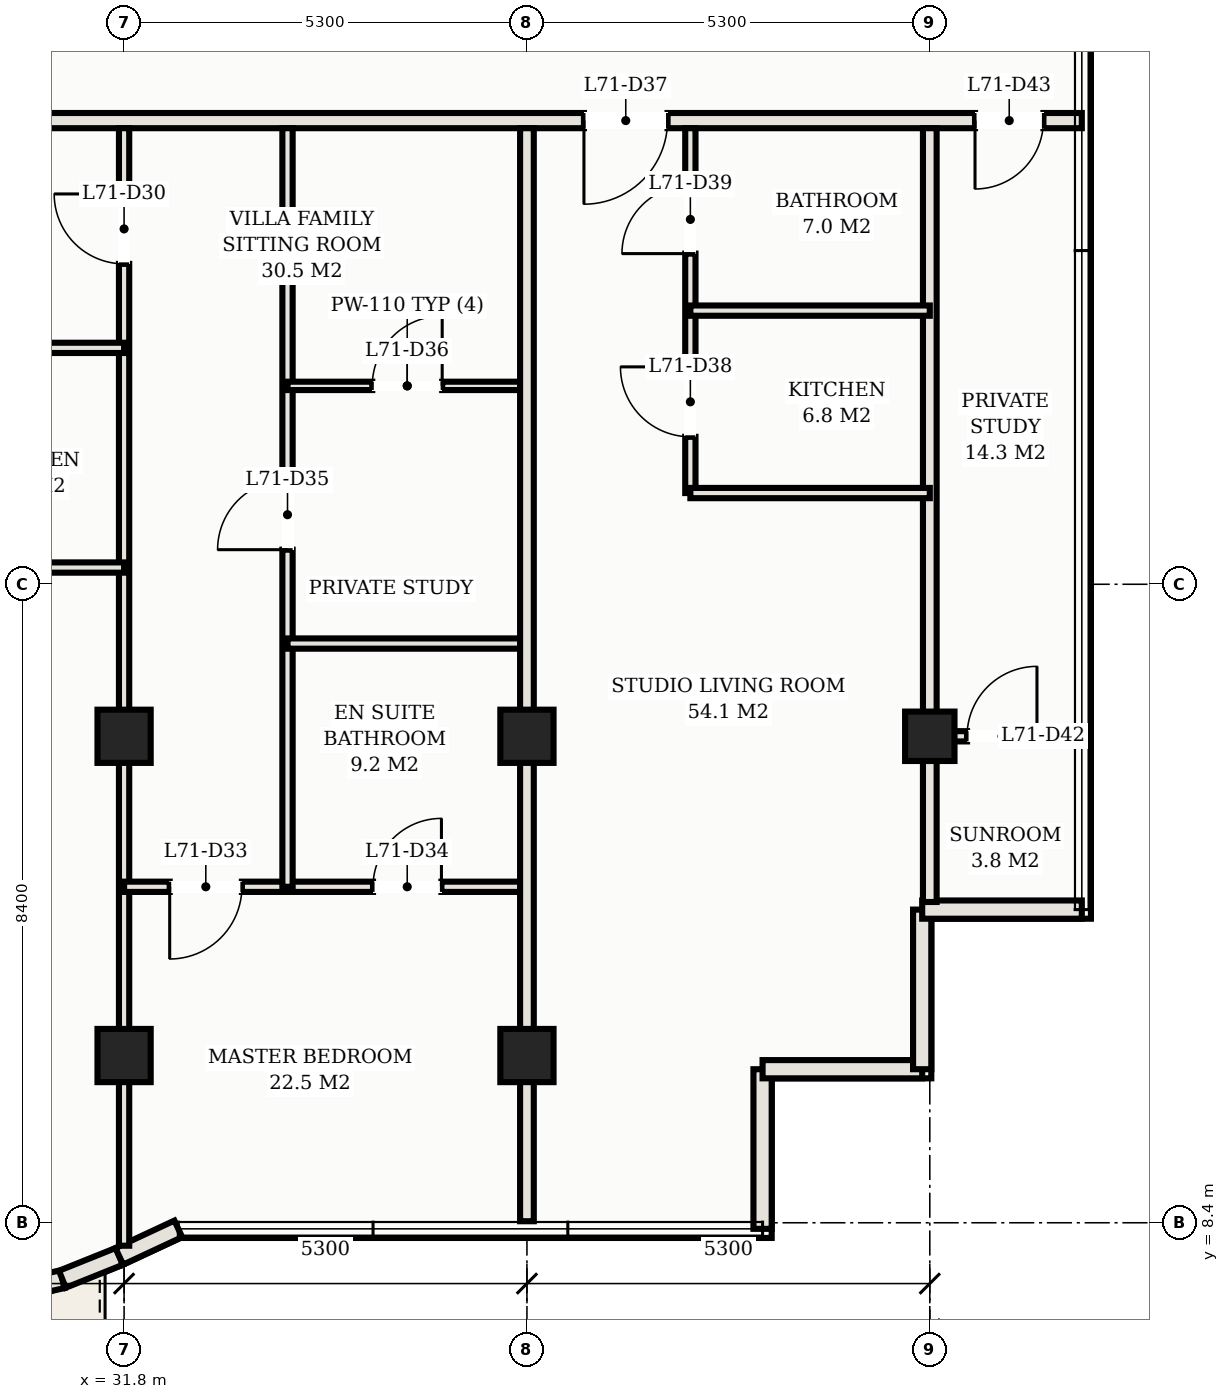
"""IFC4 building model, lengths in metres.
Left out: names, types, materials, properties, quantities, classifications, styles, units other than length and angle.
Written with IfcOpenShell. Run it as: python <this file> out.ifc"""

import sys

from ifc_helpers import new_model, si_unit, direction, frame, frame_2d, origin, origin_2d, place, context, subcontext, project, spatial, rectangle, hollow_rectangle, extrude, element, fill, save


model = new_model("IFC4")
c1 = context("Model", 3, precision=1e-05, world=origin(), true_north=direction((0.0, 1.0)))
c2 = subcontext(c1, "Body", "Model", "MODEL_VIEW")
j1 = project(units=[si_unit("LENGTHUNIT", "METRE"), si_unit("PLANEANGLEUNIT", "RADIAN")], contexts=[c1])
p1 = place(None, origin())
s1 = spatial("IfcSite", under=j1, at=p1, CompositionType="ELEMENT")
p2 = place(p1, origin())
s2 = spatial("IfcBuilding", under=s1, at=p2, CompositionType="ELEMENT")
p3 = place(p2, frame((0.0, 0.0, 256.1)))
s3 = spatial("IfcBuildingStorey", under=s2, at=p3, CompositionType="ELEMENT", Elevation=256.1)
for number, where, z_axis, x_axis in (
    (1, (31.8, 14.8, 0.0), (0.0, 0.0, 1.0), (1.0, 0.0, 0.0)),
    (2, (31.8, 10.6, 0.0), (0.0, 0.0, 1.0), (1.0, 0.0, 0.0)),
    (3, (37.1, 14.8, 0.0), (0.0, 0.0, 1.0), (1.0, 0.0, 0.0)),
    (4, (37.1, 10.6, 0.0), (0.0, 0.0, 1.0), (1.0, 0.0, 0.0)),
):
    element("IfcColumn", number, at=place(p3, frame(where, z_axis=z_axis, x_axis=x_axis)), inside=s3, PredefinedType="COLUMN", context=c2, shape_type="SweptSolid", body=[
        extrude(hollow_rectangle(XDim=0.7, YDim=0.7, WallThickness=0.025, at=origin_2d()), origin(), (0.0, 0.0, 1.0), 3.3),
    ])
p4 = place(p3, frame((42.4, 14.8, 0.0), z_axis=(0.0, 0.0, 1.0), x_axis=(1.0, 0.0, 0.0)))
e5 = element("IfcColumn", 5, at=p4, inside=s3, PredefinedType="COLUMN", context=c2, shape_type="SweptSolid", body=[
    extrude(hollow_rectangle(XDim=0.65, YDim=0.65, WallThickness=0.022, at=origin_2d()), origin(), (0.0, 0.0, 1.0), 3.3),
])
p5 = place(p3, frame((27.248, 6.843, 0.0), z_axis=(0.0, 0.0, 1.0), x_axis=(0.977126252677, 0.212660025225, 0.0)))
e6 = element("IfcWall", 6, at=p5, inside=s3, PredefinedType="SOLIDWALL", context=c2, shape_type="SweptSolid", body=[
    extrude(rectangle(XDim=3.828, YDim=0.24, at=frame_2d((1.914, 0.0))), origin(), (0.0, 0.0, 1.0), 3.11),
])
p6 = place(p5, frame((1.014, 0.0, 0.0)))
e7 = element("IfcOpeningElement", 7, at=p6, cuts=e6, PredefinedType="OPENING", context=c2, shape_type="SweptSolid", body=[
    extrude(rectangle(XDim=1.8, YDim=2.2, at=frame_2d((0.9, 1.1))), frame((0.0, 0.13, 0.0), z_axis=(0.0, -1.0, 0.0), x_axis=(1.0, 0.0, 0.0)), (0.0, 0.0, 1.0), 0.26),
])
p7 = place(p3, frame((30.988, 7.657, 0.0), z_axis=(0.0, 0.0, 1.0), x_axis=(0.927870589467, 0.372902358805, 0.0)))
e8 = element("IfcWall", 8, at=p7, inside=s3, PredefinedType="SOLIDWALL", context=c2, shape_type="SweptSolid", body=[
    extrude(rectangle(XDim=0.807, YDim=0.24, at=frame_2d((0.404, 0.0))), origin(), (0.0, 0.0, 1.0), 3.11),
])
p8 = place(p3, frame((31.737, 7.958, 0.0), z_axis=(0.0, 0.0, 1.0), x_axis=(0.906190424584, 0.422869855147, 0.0)))
e9 = element("IfcWall", 9, at=p8, inside=s3, PredefinedType="SOLIDWALL", context=c2, shape_type="SweptSolid", body=[
    extrude(rectangle(XDim=0.856, YDim=0.24, at=frame_2d((0.428, 0.0))), origin(), (0.0, 0.0, 1.0), 3.11),
])
p9 = place(p3, frame((40.2, 8.32, 0.0), z_axis=(0.0, 0.0, 1.0), x_axis=(0.0, 1.0, 0.0)))
e10 = element("IfcWall", 10, at=p9, inside=s3, PredefinedType="SOLIDWALL", context=c2, shape_type="SweptSolid", body=[
    extrude(rectangle(XDim=2.1, YDim=0.24, at=frame_2d((1.05, 0.0))), origin(), (0.0, 0.0, 1.0), 3.11),
])
for number, where, z_axis, x_axis in (
    (11, (40.2, 10.42, 0.0), (0.0, 0.0, 1.0), (1.0, 0.0, 0.0)),
    (12, (42.3, 10.42, 0.0), (0.0, 0.0, 1.0), (0.0, 1.0, 0.0)),
):
    element("IfcWall", number, at=place(p3, frame(where, z_axis=z_axis, x_axis=x_axis)), inside=s3, PredefinedType="SOLIDWALL", context=c2, shape_type="SweptSolid", body=[
        extrude(rectangle(XDim=2.1, YDim=0.24, at=frame_2d((1.05, 0.0))), origin(), (0.0, 0.0, 1.0), 3.11),
    ])
p10 = place(p3, frame((42.3, 12.52, 0.0), z_axis=(0.0, 0.0, 1.0), x_axis=(1.0, 0.0, 0.0)))
e13 = element("IfcWall", 13, at=p10, inside=s3, PredefinedType="SOLIDWALL", context=c2, shape_type="SweptSolid", body=[
    extrude(rectangle(XDim=2.1, YDim=0.24, at=frame_2d((1.05, 0.0))), origin(), (0.0, 0.0, 1.0), 3.11),
])
p11 = place(p3, frame((8.6, 22.9, 0.0), z_axis=(0.0, 0.0, 1.0), x_axis=(1.0, 0.0, 0.0)))
e14 = element("IfcWall", 14, at=p11, inside=s3, PredefinedType="PARTITIONING", context=c2, shape_type="SweptSolid", body=[
    extrude(rectangle(XDim=35.8, YDim=0.2, at=frame_2d((17.9, 0.0))), origin(), (0.0, 0.0, 1.0), 2.45),
])
p12 = place(p11, frame((2.625, 0.0, 0.0)))
e15 = element("IfcOpeningElement", 15, at=p12, cuts=e14, PredefinedType="OPENING", context=c2, shape_type="SweptSolid", body=[
    extrude(rectangle(XDim=1.35, YDim=2.33, at=frame_2d((0.675, 1.165))), frame((0.0, 0.11, 0.0), z_axis=(0.0, -1.0, 0.0), x_axis=(1.0, 0.0, 0.0)), (0.0, 0.0, 1.0), 0.22),
])
p13 = place(p11, frame((18.65, 0.0, 0.0)))
e16 = element("IfcOpeningElement", 16, at=p13, cuts=e14, PredefinedType="OPENING", context=c2, shape_type="SweptSolid", body=[
    extrude(rectangle(XDim=1.1, YDim=2.25, at=frame_2d((0.55, 1.125))), frame((0.0, 0.11, 0.0), z_axis=(0.0, -1.0, 0.0), x_axis=(1.0, 0.0, 0.0)), (0.0, 0.0, 1.0), 0.22),
])
p14 = place(p11, frame((29.25, 0.0, 0.0)))
e17 = element("IfcOpeningElement", 17, at=p14, cuts=e14, PredefinedType="OPENING", context=c2, shape_type="SweptSolid", body=[
    extrude(rectangle(XDim=1.1, YDim=2.25, at=frame_2d((0.55, 1.125))), frame((0.0, 0.11, 0.0), z_axis=(0.0, -1.0, 0.0), x_axis=(1.0, 0.0, 0.0)), (0.0, 0.0, 1.0), 0.22),
])
p15 = place(p11, frame((0.505, 0.0, 0.0)))
e18 = element("IfcOpeningElement", 18, at=p15, cuts=e14, PredefinedType="OPENING", context=c2, shape_type="SweptSolid", body=[
    extrude(rectangle(XDim=0.9, YDim=2.15, at=frame_2d((0.45, 1.075))), frame((0.0, 0.11, 0.0), z_axis=(0.0, -1.0, 0.0), x_axis=(1.0, 0.0, 0.0)), (0.0, 0.0, 1.0), 0.22),
])
p16 = place(p11, frame((34.395, 0.0, 0.0)))
e19 = element("IfcOpeningElement", 19, at=p16, cuts=e14, PredefinedType="OPENING", context=c2, shape_type="SweptSolid", body=[
    extrude(rectangle(XDim=0.9, YDim=2.15, at=frame_2d((0.45, 1.075))), frame((0.0, 0.11, 0.0), z_axis=(0.0, -1.0, 0.0), x_axis=(1.0, 0.0, 0.0)), (0.0, 0.0, 1.0), 0.22),
])
p17 = place(p3, frame((42.4, 12.62, 0.0), z_axis=(0.0, 0.0, 1.0), x_axis=(0.0, 1.0, 0.0)))
e20 = element("IfcWall", 20, at=p17, inside=s3, PredefinedType="PARTITIONING", context=c2, shape_type="SweptSolid", body=[
    extrude(rectangle(XDim=10.18, YDim=0.18, at=frame_2d((5.09, 0.0))), origin(), (0.0, 0.0, 1.0), 2.45),
])
p18 = place(p3, frame((31.8, 8.098, 0.0), z_axis=(0.0, 0.0, 1.0), x_axis=(0.0, 1.0, 0.0)))
e21 = element("IfcWall", 21, at=p18, inside=s3, PredefinedType="PARTITIONING", context=c2, shape_type="SweptSolid", body=[
    extrude(rectangle(XDim=14.702, YDim=0.135, at=frame_2d((7.351, 0.0))), origin(), (0.0, 0.0, 1.0), 2.45),
])
p19 = place(p18, frame((12.917, 0.0, 0.0)))
e22 = element("IfcOpeningElement", 22, at=p19, cuts=e21, PredefinedType="OPENING", context=c2, shape_type="SweptSolid", body=[
    extrude(rectangle(XDim=0.92, YDim=2.15, at=frame_2d((0.46, 1.075))), frame((0.0, 0.078, 0.0), z_axis=(0.0, -1.0, 0.0), x_axis=(1.0, 0.0, 0.0)), (0.0, 0.0, 1.0), 0.155),
])
for number, where, z_axis, x_axis in (
    (23, (28.65, 17.02, 0.0), (0.0, 0.0, 1.0), (1.0, 0.0, 0.0)),
    (24, (28.65, 19.91, 0.0), (0.0, 0.0, 1.0), (1.0, 0.0, 0.0)),
):
    element("IfcWall", number, at=place(p3, frame(where, z_axis=z_axis, x_axis=x_axis)), inside=s3, PredefinedType="PARTITIONING", context=c2, shape_type="SweptSolid", body=[
        extrude(rectangle(XDim=3.15, YDim=0.135, at=frame_2d((1.575, 0.0))), origin(), (0.0, 0.0, 1.0), 2.45),
    ])
p20 = place(p3, frame((31.8, 12.82, 0.0), z_axis=(0.0, 0.0, 1.0), x_axis=(1.0, 0.0, 0.0)))
e25 = element("IfcWall", 25, at=p20, inside=s3, PredefinedType="PARTITIONING", context=c2, shape_type="SweptSolid", body=[
    extrude(rectangle(XDim=5.3, YDim=0.135, at=frame_2d((2.65, 0.0))), origin(), (0.0, 0.0, 1.0), 2.45),
])
p21 = place(p20, frame((0.6, 0.0, 0.0)))
e26 = element("IfcOpeningElement", 26, at=p21, cuts=e25, PredefinedType="OPENING", context=c2, shape_type="SweptSolid", body=[
    extrude(rectangle(XDim=0.95, YDim=2.15, at=frame_2d((0.475, 1.075))), frame((0.0, 0.078, 0.0), z_axis=(0.0, -1.0, 0.0), x_axis=(1.0, 0.0, 0.0)), (0.0, 0.0, 1.0), 0.155),
])
p22 = place(p20, frame((3.275, 0.0, 0.0)))
e27 = element("IfcOpeningElement", 27, at=p22, cuts=e25, PredefinedType="OPENING", context=c2, shape_type="SweptSolid", body=[
    extrude(rectangle(XDim=0.9, YDim=2.15, at=frame_2d((0.45, 1.075))), frame((0.0, 0.078, 0.0), z_axis=(0.0, -1.0, 0.0), x_axis=(1.0, 0.0, 0.0)), (0.0, 0.0, 1.0), 0.155),
])
p23 = place(p3, frame((33.95, 12.82, 0.0), z_axis=(0.0, 0.0, 1.0), x_axis=(0.0, 1.0, 0.0)))
e28 = element("IfcWall", 28, at=p23, inside=s3, PredefinedType="PARTITIONING", context=c2, shape_type="SweptSolid", body=[
    extrude(rectangle(XDim=9.98, YDim=0.135, at=frame_2d((4.99, 0.0))), origin(), (0.0, 0.0, 1.0), 2.45),
])
p24 = place(p23, frame((4.435, 0.0, 0.0)))
e29 = element("IfcOpeningElement", 29, at=p24, cuts=e28, PredefinedType="OPENING", context=c2, shape_type="SweptSolid", body=[
    extrude(rectangle(XDim=0.92, YDim=2.15, at=frame_2d((0.46, 1.075))), frame((0.0, 0.078, 0.0), z_axis=(0.0, -1.0, 0.0), x_axis=(1.0, 0.0, 0.0)), (0.0, 0.0, 1.0), 0.155),
])
p25 = place(p3, frame((33.95, 16.02, 0.0), z_axis=(0.0, 0.0, 1.0), x_axis=(1.0, 0.0, 0.0)))
e30 = element("IfcWall", 30, at=p25, inside=s3, PredefinedType="PARTITIONING", context=c2, shape_type="SweptSolid", body=[
    extrude(rectangle(XDim=3.15, YDim=0.135, at=frame_2d((1.575, 0.0))), origin(), (0.0, 0.0, 1.0), 2.45),
])
p26 = place(p3, frame((33.95, 19.41, 0.0), z_axis=(0.0, 0.0, 1.0), x_axis=(1.0, 0.0, 0.0)))
e31 = element("IfcWall", 31, at=p26, inside=s3, PredefinedType="MOVABLE", context=c2, shape_type="SweptSolid", body=[
    extrude(rectangle(XDim=3.15, YDim=0.11, at=frame_2d((1.575, 0.0))), origin(), (0.0, 0.0, 1.0), 2.45),
])
p27 = place(p26, frame((1.115, 0.0, 0.0)))
e32 = element("IfcOpeningElement", 32, at=p27, cuts=e31, PredefinedType="OPENING", context=c2, shape_type="SweptSolid", body=[
    extrude(rectangle(XDim=0.92, YDim=2.15, at=frame_2d((0.46, 1.075))), frame((0.0, 0.065, 0.0), z_axis=(0.0, -1.0, 0.0), x_axis=(1.0, 0.0, 0.0)), (0.0, 0.0, 1.0), 0.13),
])
p28 = place(p3, frame((37.1, 8.42, 0.0), z_axis=(0.0, 0.0, 1.0), x_axis=(0.0, 1.0, 0.0)))
e33 = element("IfcWall", 33, at=p28, inside=s3, PredefinedType="PARTITIONING", context=c2, shape_type="SweptSolid", body=[
    extrude(rectangle(XDim=14.38, YDim=0.18, at=frame_2d((7.19, 0.0))), origin(), (0.0, 0.0, 1.0), 2.45),
])
p29 = place(p3, frame((39.25, 18.0, 0.0), z_axis=(0.0, 0.0, 1.0), x_axis=(0.0, 1.0, 0.0)))
e34 = element("IfcWall", 34, at=p29, inside=s3, PredefinedType="PARTITIONING", context=c2, shape_type="SweptSolid", body=[
    extrude(rectangle(XDim=4.8, YDim=0.135, at=frame_2d((2.4, 0.0))), origin(), (0.0, 0.0, 1.0), 2.45),
])
p30 = place(p29, frame((0.74, 0.0, 0.0)))
e35 = element("IfcOpeningElement", 35, at=p30, cuts=e34, PredefinedType="OPENING", context=c2, shape_type="SweptSolid", body=[
    extrude(rectangle(XDim=0.92, YDim=2.15, at=frame_2d((0.46, 1.075))), frame((0.0, 0.078, 0.0), z_axis=(0.0, -1.0, 0.0), x_axis=(1.0, 0.0, 0.0)), (0.0, 0.0, 1.0), 0.155),
])
p31 = place(p29, frame((3.15, 0.0, 0.0)))
e36 = element("IfcOpeningElement", 36, at=p31, cuts=e34, PredefinedType="OPENING", context=c2, shape_type="SweptSolid", body=[
    extrude(rectangle(XDim=0.9, YDim=2.15, at=frame_2d((0.45, 1.075))), frame((0.0, 0.078, 0.0), z_axis=(0.0, -1.0, 0.0), x_axis=(1.0, 0.0, 0.0)), (0.0, 0.0, 1.0), 0.155),
])
for number, where, z_axis, x_axis in (
    (37, (39.25, 18.0, 0.0), (0.0, 0.0, 1.0), (1.0, 0.0, 0.0)),
    (38, (39.25, 20.4, 0.0), (0.0, 0.0, 1.0), (1.0, 0.0, 0.0)),
):
    element("IfcWall", number, at=place(p3, frame(where, z_axis=z_axis, x_axis=x_axis)), inside=s3, PredefinedType="PARTITIONING", context=c2, shape_type="SweptSolid", body=[
        extrude(rectangle(XDim=3.15, YDim=0.135, at=frame_2d((1.575, 0.0))), origin(), (0.0, 0.0, 1.0), 2.45),
    ])
p32 = place(p3, frame((42.4, 14.8, 0.0), z_axis=(0.0, 0.0, 1.0), x_axis=(1.0, 0.0, 0.0)))
e39 = element("IfcWall", 39, at=p32, inside=s3, PredefinedType="PARTITIONING", context=c2, shape_type="SweptSolid", body=[
    extrude(rectangle(XDim=1.9, YDim=0.135, at=frame_2d((0.95, 0.0))), origin(), (0.0, 0.0, 1.0), 2.45),
])
p33 = place(p32, frame((0.49, 0.0, 0.0)))
e40 = element("IfcOpeningElement", 40, at=p33, cuts=e39, PredefinedType="OPENING", context=c2, shape_type="SweptSolid", body=[
    extrude(rectangle(XDim=0.92, YDim=2.15, at=frame_2d((0.46, 1.075))), frame((0.0, 0.078, 0.0), z_axis=(0.0, -1.0, 0.0), x_axis=(1.0, 0.0, 0.0)), (0.0, 0.0, 1.0), 0.155),
])
p34 = place(p19, origin())
e41 = element("IfcDoor", 41, at=p34, inside=s3, OperationType="SINGLE_SWING_RIGHT", PredefinedType="DOOR", context=c2, shape_type="SweptSolid", body=[
    extrude(rectangle(XDim=0.92, YDim=2.15, at=frame_2d((0.46, 1.075))), frame((0.0, 0.025, 0.0), z_axis=(0.0, -1.0, 0.0), x_axis=(1.0, 0.0, 0.0)), (0.0, 0.0, 1.0), 0.05),
])
fill(e22, e41)
p35 = place(p21, frame((0.95, 0.0, 0.0), z_axis=(0.0, 0.0, 1.0), x_axis=(-1.0, 0.0, 0.0)))
e42 = element("IfcDoor", 42, at=p35, inside=s3, OperationType="SINGLE_SWING_RIGHT", PredefinedType="DOOR", context=c2, shape_type="SweptSolid", body=[
    extrude(rectangle(XDim=0.95, YDim=2.15, at=frame_2d((0.475, 1.075))), frame((0.0, 0.025, 0.0), z_axis=(0.0, -1.0, 0.0), x_axis=(1.0, 0.0, 0.0)), (0.0, 0.0, 1.0), 0.05),
])
fill(e26, e42)
p36 = place(p22, origin())
e43 = element("IfcDoor", 43, at=p36, inside=s3, OperationType="SINGLE_SWING_RIGHT", PredefinedType="DOOR", context=c2, shape_type="SweptSolid", body=[
    extrude(rectangle(XDim=0.9, YDim=2.15, at=frame_2d((0.45, 1.075))), frame((0.0, 0.025, 0.0), z_axis=(0.0, -1.0, 0.0), x_axis=(1.0, 0.0, 0.0)), (0.0, 0.0, 1.0), 0.05),
])
fill(e27, e43)
p37 = place(p24, origin())
e44 = element("IfcDoor", 44, at=p37, inside=s3, OperationType="SINGLE_SWING_LEFT", PredefinedType="DOOR", context=c2, shape_type="SweptSolid", body=[
    extrude(rectangle(XDim=0.92, YDim=2.15, at=frame_2d((0.46, 1.075))), frame((0.0, 0.025, 0.0), z_axis=(0.0, -1.0, 0.0), x_axis=(1.0, 0.0, 0.0)), (0.0, 0.0, 1.0), 0.05),
])
fill(e29, e44)
p38 = place(p27, origin())
e45 = element("IfcDoor", 45, at=p38, inside=s3, OperationType="SINGLE_SWING_RIGHT", PredefinedType="DOOR", context=c2, shape_type="SweptSolid", body=[
    extrude(rectangle(XDim=0.92, YDim=2.15, at=frame_2d((0.46, 1.075))), frame((0.0, 0.025, 0.0), z_axis=(0.0, -1.0, 0.0), x_axis=(1.0, 0.0, 0.0)), (0.0, 0.0, 1.0), 0.05),
])
fill(e32, e45)
p39 = place(p14, frame((1.1, 0.0, 0.0), z_axis=(0.0, 0.0, 1.0), x_axis=(-1.0, 0.0, 0.0)))
e46 = element("IfcDoor", 46, at=p39, inside=s3, OperationType="SINGLE_SWING_RIGHT", PredefinedType="DOOR", context=c2, shape_type="SweptSolid", body=[
    extrude(rectangle(XDim=1.1, YDim=2.25, at=frame_2d((0.55, 1.125))), frame((0.0, 0.025, 0.0), z_axis=(0.0, -1.0, 0.0), x_axis=(1.0, 0.0, 0.0)), (0.0, 0.0, 1.0), 0.05),
])
fill(e17, e46)
p40 = place(p30, origin())
e47 = element("IfcDoor", 47, at=p40, inside=s3, OperationType="SINGLE_SWING_RIGHT", PredefinedType="DOOR", context=c2, shape_type="SweptSolid", body=[
    extrude(rectangle(XDim=0.92, YDim=2.15, at=frame_2d((0.46, 1.075))), frame((0.0, 0.025, 0.0), z_axis=(0.0, -1.0, 0.0), x_axis=(1.0, 0.0, 0.0)), (0.0, 0.0, 1.0), 0.05),
])
fill(e35, e47)
p41 = place(p31, origin())
e48 = element("IfcDoor", 48, at=p41, inside=s3, OperationType="SINGLE_SWING_LEFT", PredefinedType="DOOR", context=c2, shape_type="SweptSolid", body=[
    extrude(rectangle(XDim=0.9, YDim=2.15, at=frame_2d((0.45, 1.075))), frame((0.0, 0.025, 0.0), z_axis=(0.0, -1.0, 0.0), x_axis=(1.0, 0.0, 0.0)), (0.0, 0.0, 1.0), 0.05),
])
fill(e36, e48)
p42 = place(p33, origin())
e49 = element("IfcDoor", 49, at=p42, inside=s3, OperationType="SINGLE_SWING_RIGHT", PredefinedType="DOOR", context=c2, shape_type="SweptSolid", body=[
    extrude(rectangle(XDim=0.92, YDim=2.15, at=frame_2d((0.46, 1.075))), frame((0.0, 0.025, 0.0), z_axis=(0.0, -1.0, 0.0), x_axis=(1.0, 0.0, 0.0)), (0.0, 0.0, 1.0), 0.05),
])
fill(e40, e49)
p43 = place(p16, frame((0.9, 0.0, 0.0), z_axis=(0.0, 0.0, 1.0), x_axis=(-1.0, 0.0, 0.0)))
e50 = element("IfcDoor", 50, at=p43, inside=s3, OperationType="SINGLE_SWING_RIGHT", PredefinedType="DOOR", context=c2, shape_type="SweptSolid", body=[
    extrude(rectangle(XDim=0.9, YDim=2.15, at=frame_2d((0.45, 1.075))), frame((0.0, 0.025, 0.0), z_axis=(0.0, -1.0, 0.0), x_axis=(1.0, 0.0, 0.0)), (0.0, 0.0, 1.0), 0.05),
])
fill(e19, e50)
save(model, sys.argv[1])
